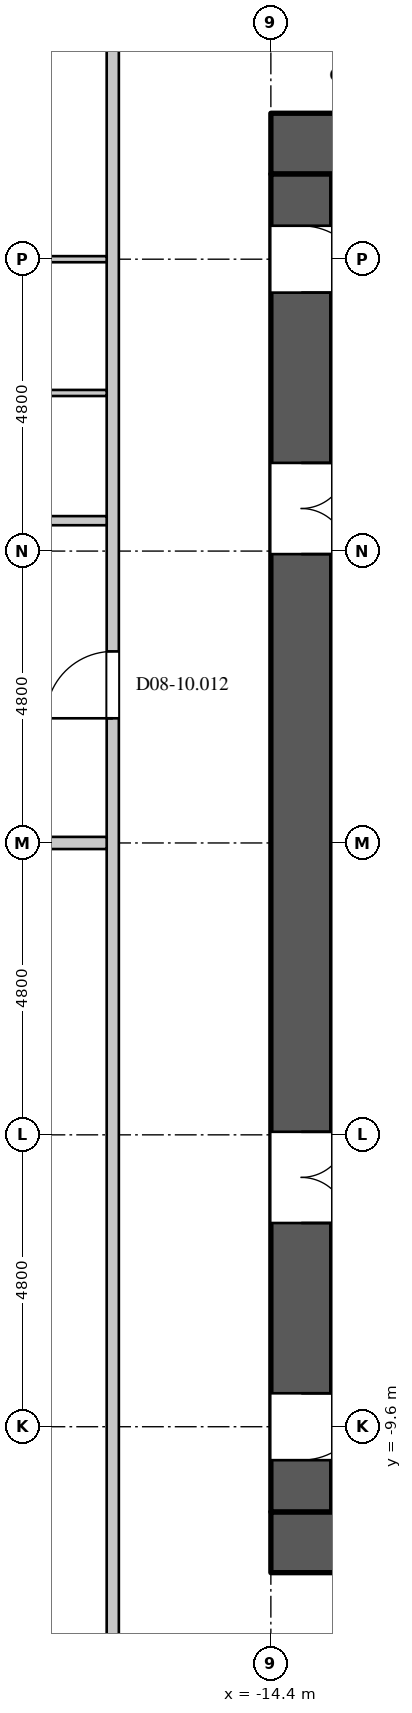
"""IFC4 building model, lengths in metres.
Left out: names, types, materials, properties, quantities, classifications, styles, units other than length and angle.
Written with IfcOpenShell. Run it as: python <this file> out.ifc"""

import sys

from ifc_helpers import new_model, si_unit, direction, frame, frame_2d, origin, place, context, subcontext, project, spatial, rectangle, extrude, element, fill, save


model = new_model("IFC4")
c1 = context("Model", 3, precision=1e-05, world=origin(), true_north=direction((0.0, 1.0)))
c2 = subcontext(c1, "Body", "Model", "MODEL_VIEW")
j1 = project(units=[si_unit("LENGTHUNIT", "METRE"), si_unit("PLANEANGLEUNIT", "RADIAN")], contexts=[c1])
p1 = place(None, origin())
s1 = spatial("IfcSite", under=j1, at=p1, CompositionType="ELEMENT")
p2 = place(p1, origin())
s2 = spatial("IfcBuilding", under=s1, at=p2, CompositionType="ELEMENT")
p3 = place(p2, frame((0.0, 0.0, 38.1)))
s3 = spatial("IfcBuildingStorey", under=s2, at=p3, CompositionType="ELEMENT", Elevation=38.1)
for number, where, z_axis, x_axis in (
    (1, (-14.4, 11.5, 0.0), (0.0, 0.0, 1.0), (1.0, 0.0, 0.0)),
    (2, (-14.4, -11.5, 0.0), (0.0, 0.0, 1.0), (1.0, 0.0, 0.0)),
):
    element("IfcWall", number, at=place(p3, frame(where, z_axis=z_axis, x_axis=x_axis)), inside=s3, PredefinedType="SHEAR", context=c2, shape_type="SweptSolid", body=[
        extrude(rectangle(XDim=28.8, YDim=1.0, at=frame_2d((14.4, 0.0))), origin(), (0.0, 0.0, 1.0), 4.2),
    ])
p4 = place(p3, frame((-13.9, -11.0, 0.0), z_axis=(0.0, 0.0, 1.0), x_axis=(0.0, 1.0, 0.0)))
e3 = element("IfcWall", 3, at=p4, inside=s3, PredefinedType="SHEAR", context=c2, shape_type="SweptSolid", body=[
    extrude(rectangle(XDim=22.0, YDim=1.0, at=frame_2d((11.0, 0.0))), origin(), (0.0, 0.0, 1.0), 4.2),
])
p5 = place(p4, frame((20.05, 0.0, 0.0)))
e4 = element("IfcOpeningElement", 4, at=p5, cuts=e3, PredefinedType="OPENING", context=c2, shape_type="SweptSolid", body=[
    extrude(rectangle(XDim=1.1, YDim=2.2, at=frame_2d((0.55, 1.1))), frame((0.0, 0.51, 0.0), z_axis=(0.0, -1.0, 0.0), x_axis=(1.0, 0.0, 0.0)), (0.0, 0.0, 1.0), 1.02),
])
p6 = place(p4, frame((0.85, 0.0, 0.0)))
e5 = element("IfcOpeningElement", 5, at=p6, cuts=e3, PredefinedType="OPENING", context=c2, shape_type="SweptSolid", body=[
    extrude(rectangle(XDim=1.1, YDim=2.2, at=frame_2d((0.55, 1.1))), frame((0.0, 0.51, 0.0), z_axis=(0.0, -1.0, 0.0), x_axis=(1.0, 0.0, 0.0)), (0.0, 0.0, 1.0), 1.02),
])
p7 = place(p4, frame((15.75, 0.0, 0.0)))
e6 = element("IfcOpeningElement", 6, at=p7, cuts=e3, PredefinedType="OPENING", context=c2, shape_type="SweptSolid", body=[
    extrude(rectangle(XDim=1.5, YDim=2.4, at=frame_2d((0.75, 1.2))), frame((0.0, 0.51, 0.0), z_axis=(0.0, -1.0, 0.0), x_axis=(1.0, 0.0, 0.0)), (0.0, 0.0, 1.0), 1.02),
])
p8 = place(p4, frame((4.75, 0.0, 0.0)))
e7 = element("IfcOpeningElement", 7, at=p8, cuts=e3, PredefinedType="OPENING", context=c2, shape_type="SweptSolid", body=[
    extrude(rectangle(XDim=1.5, YDim=2.4, at=frame_2d((0.75, 1.2))), frame((0.0, 0.51, 0.0), z_axis=(0.0, -1.0, 0.0), x_axis=(1.0, 0.0, 0.0)), (0.0, 0.0, 1.0), 1.02),
])
p9 = place(p3, frame((-17.0, -14.5, 0.0), z_axis=(0.0, 0.0, 1.0), x_axis=(0.0, 1.0, 0.0)))
e8 = element("IfcWall", 8, at=p9, inside=s3, PredefinedType="PARTITIONING", context=c2, shape_type="SweptSolid", body=[
    extrude(rectangle(XDim=29.0, YDim=0.2, at=frame_2d((14.5, 0.0))), origin(), (0.0, 0.0, 1.0), 3.95),
])
p10 = place(p9, frame((16.55, 0.0, 0.0)))
e9 = element("IfcOpeningElement", 9, at=p10, cuts=e8, PredefinedType="OPENING", context=c2, shape_type="SweptSolid", body=[
    extrude(rectangle(XDim=1.1, YDim=2.4, at=frame_2d((0.55, 1.2))), frame((0.0, 0.11, 0.0), z_axis=(0.0, -1.0, 0.0), x_axis=(1.0, 0.0, 0.0)), (0.0, 0.0, 1.0), 0.22),
])
p11 = place(p3, frame((-22.947, -12.051, 0.0), z_axis=(0.0, 0.0, 1.0), x_axis=(0.707106781187, -0.707106781187, 0.0)))
e10 = element("IfcWall", 10, at=p11, inside=s3, PredefinedType="PARTITIONING", context=c2, shape_type="SweptSolid", body=[
    extrude(rectangle(XDim=7.705, YDim=0.15, at=frame_2d((3.853, 0.0))), origin(), (0.0, 0.0, 1.0), 3.95),
])
p12 = place(p11, frame((4.65, 0.0, 0.0)))
e11 = element("IfcOpeningElement", 11, at=p12, cuts=e10, PredefinedType="OPENING", context=c2, shape_type="SweptSolid", body=[
    extrude(rectangle(XDim=0.95, YDim=2.2, at=frame_2d((0.475, 1.1))), frame((0.0, 0.085, 0.0), z_axis=(0.0, -1.0, 0.0), x_axis=(1.0, 0.0, 0.0)), (0.0, 0.0, 1.0), 0.17),
])
p13 = place(p3, frame((-22.547, 11.885, 0.0), z_axis=(0.0, 0.0, 1.0), x_axis=(0.707106781187, 0.707106781187, 0.0)))
e12 = element("IfcWall", 12, at=p13, inside=s3, PredefinedType="PARTITIONING", context=c2, shape_type="SweptSolid", body=[
    extrude(rectangle(XDim=7.464, YDim=0.15, at=frame_2d((3.732, 0.0))), origin(), (0.0, 0.0, 1.0), 3.95),
])
p14 = place(p13, frame((3.95, 0.0, 0.0)))
e13 = element("IfcOpeningElement", 13, at=p14, cuts=e12, PredefinedType="OPENING", context=c2, shape_type="SweptSolid", body=[
    extrude(rectangle(XDim=0.95, YDim=2.2, at=frame_2d((0.475, 1.1))), frame((0.0, 0.085, 0.0), z_axis=(0.0, -1.0, 0.0), x_axis=(1.0, 0.0, 0.0)), (0.0, 0.0, 1.0), 0.17),
])
p15 = place(p3, frame((-21.725, 5.3, 0.0), z_axis=(0.0, 0.0, 1.0), x_axis=(1.0, 0.0, 0.0)))
e14 = element("IfcWall", 14, at=p15, inside=s3, PredefinedType="PARTITIONING", context=c2, shape_type="SweptSolid", body=[
    extrude(rectangle(XDim=4.625, YDim=0.15, at=frame_2d((2.312, 0.0))), origin(), (0.0, 0.0, 1.0), 3.95),
])
p16 = place(p15, frame((1.85, 0.0, 0.0)))
e15 = element("IfcOpeningElement", 15, at=p16, cuts=e14, PredefinedType="OPENING", context=c2, shape_type="SweptSolid", body=[
    extrude(rectangle(XDim=0.95, YDim=2.2, at=frame_2d((0.475, 1.1))), frame((0.0, 0.085, 0.0), z_axis=(0.0, -1.0, 0.0), x_axis=(1.0, 0.0, 0.0)), (0.0, 0.0, 1.0), 0.17),
])
p17 = place(p3, frame((-28.855, 0.0, 0.0), z_axis=(0.0, 0.0, 1.0), x_axis=(1.0, 0.0, 0.0)))
e16 = element("IfcWall", 16, at=p17, inside=s3, PredefinedType="PARTITIONING", context=c2, shape_type="SweptSolid", body=[
    extrude(rectangle(XDim=11.755, YDim=0.2, at=frame_2d((5.877, 0.0))), origin(), (0.0, 0.0, 1.0), 3.95),
])
p18 = place(p3, frame((-21.78, 9.6, 0.0), z_axis=(0.0, 0.0, 1.0), x_axis=(1.0, 0.0, 0.0)))
e17 = element("IfcWall", 17, at=p18, inside=s3, PredefinedType="PARTITIONING", context=c2, shape_type="SweptSolid", body=[
    extrude(rectangle(XDim=4.68, YDim=0.1, at=frame_2d((2.34, 0.0))), origin(), (0.0, 0.0, 1.0), 3.95),
])
p19 = place(p18, frame((1.85, 0.0, 0.0)))
e18 = element("IfcOpeningElement", 18, at=p19, cuts=e17, PredefinedType="OPENING", context=c2, shape_type="SweptSolid", body=[
    extrude(rectangle(XDim=0.9, YDim=2.2, at=frame_2d((0.45, 1.1))), frame((0.0, 0.06, 0.0), z_axis=(0.0, -1.0, 0.0), x_axis=(1.0, 0.0, 0.0)), (0.0, 0.0, 1.0), 0.12),
])
p20 = place(p3, frame((-21.725, 7.4, 0.0), z_axis=(0.0, 0.0, 1.0), x_axis=(1.0, 0.0, 0.0)))
e19 = element("IfcWall", 19, at=p20, inside=s3, PredefinedType="PARTITIONING", context=c2, shape_type="SweptSolid", body=[
    extrude(rectangle(XDim=4.625, YDim=0.1, at=frame_2d((2.312, 0.0))), origin(), (0.0, 0.0, 1.0), 3.95),
])
p21 = place(p5, origin())
e20 = element("IfcDoor", 20, at=p21, inside=s3, OperationType="SINGLE_SWING_RIGHT", PredefinedType="DOOR", context=c2, shape_type="SweptSolid", body=[
    extrude(rectangle(XDim=1.1, YDim=2.2, at=frame_2d((0.55, 1.1))), frame((0.0, -0.445, 0.0), z_axis=(0.0, -1.0, 0.0), x_axis=(1.0, 0.0, 0.0)), (0.0, 0.0, 1.0), 0.05),
])
fill(e4, e20)
p22 = place(p6, origin())
e21 = element("IfcDoor", 21, at=p22, inside=s3, OperationType="SINGLE_SWING_LEFT", PredefinedType="DOOR", context=c2, shape_type="SweptSolid", body=[
    extrude(rectangle(XDim=1.1, YDim=2.2, at=frame_2d((0.55, 1.1))), frame((0.0, -0.445, 0.0), z_axis=(0.0, -1.0, 0.0), x_axis=(1.0, 0.0, 0.0)), (0.0, 0.0, 1.0), 0.05),
])
fill(e5, e21)
p23 = place(p7, origin())
e22 = element("IfcDoor", 22, at=p23, inside=s3, OperationType="DOUBLE_DOOR_SINGLE_SWING", PredefinedType="DOOR", context=c2, shape_type="SweptSolid", body=[
    extrude(rectangle(XDim=1.5, YDim=2.4, at=frame_2d((0.75, 1.2))), frame((0.0, -0.445, 0.0), z_axis=(0.0, -1.0, 0.0), x_axis=(1.0, 0.0, 0.0)), (0.0, 0.0, 1.0), 0.05),
])
fill(e6, e22)
p24 = place(p8, origin())
e23 = element("IfcDoor", 23, at=p24, inside=s3, OperationType="DOUBLE_DOOR_SINGLE_SWING", PredefinedType="DOOR", context=c2, shape_type="SweptSolid", body=[
    extrude(rectangle(XDim=1.5, YDim=2.4, at=frame_2d((0.75, 1.2))), frame((0.0, -0.445, 0.0), z_axis=(0.0, -1.0, 0.0), x_axis=(1.0, 0.0, 0.0)), (0.0, 0.0, 1.0), 0.05),
])
fill(e7, e23)
p25 = place(p10, origin())
e24 = element("IfcDoor", 24, at=p25, inside=s3, OperationType="SINGLE_SWING_LEFT", PredefinedType="DOOR", context=c2, shape_type="SweptSolid", body=[
    extrude(rectangle(XDim=1.1, YDim=2.4, at=frame_2d((0.55, 1.2))), frame((0.0, 0.025, 0.0), z_axis=(0.0, -1.0, 0.0), x_axis=(1.0, 0.0, 0.0)), (0.0, 0.0, 1.0), 0.05),
])
fill(e9, e24)
save(model, sys.argv[1])
